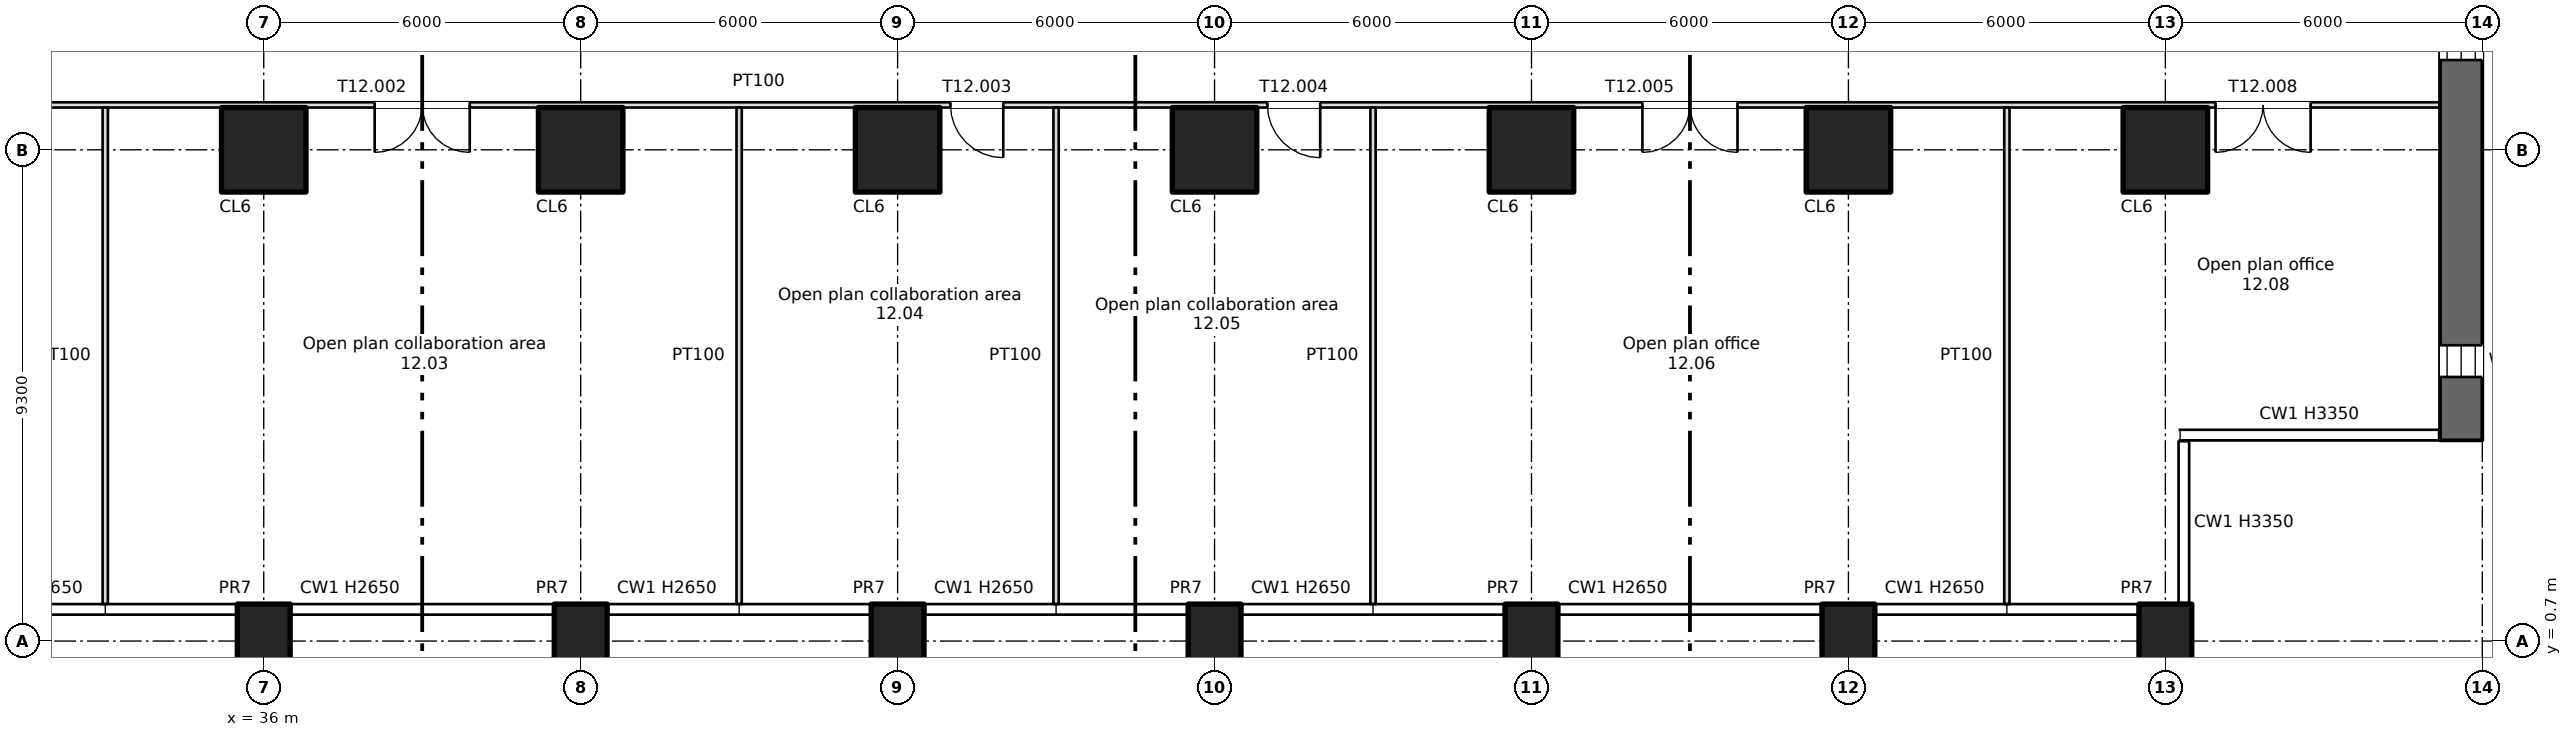
"""IFC4 building model, lengths in metres.
Left out: names, types, materials, properties, quantities, classifications, styles, units other than length and angle.
Written with IfcOpenShell. Run it as: python <this file> out.ifc"""

import sys

from ifc_helpers import new_model, si_unit, direction, frame, frame_2d, origin, origin_2d, place, context, subcontext, project, spatial, rectangle, extrude, element, fill, save


model = new_model("IFC4")
c1 = context("Model", 3, precision=1e-05, world=origin(), true_north=direction((0.0, 1.0)))
c2 = subcontext(c1, "Body", "Model", "MODEL_VIEW")
j1 = project(units=[si_unit("LENGTHUNIT", "METRE"), si_unit("PLANEANGLEUNIT", "RADIAN")], contexts=[c1])
p1 = place(None, origin())
s1 = spatial("IfcSite", under=j1, at=p1, CompositionType="ELEMENT")
p2 = place(p1, origin())
s2 = spatial("IfcBuilding", under=s1, at=p2, CompositionType="ELEMENT")
p3 = place(p2, frame((0.0, 0.0, 63.75)))
s3 = spatial("IfcBuildingStorey", under=s2, at=p3, CompositionType="ELEMENT", Elevation=63.75)
for number, where, z_axis, x_axis in (
    (1, (36.0, 0.7, -0.4), (0.0, 0.0, 1.0), (1.0, 0.0, 0.0)),
    (2, (42.0, 0.7, -0.4), (0.0, 0.0, 1.0), (1.0, 0.0, 0.0)),
    (3, (48.0, 0.7, -0.4), (0.0, 0.0, 1.0), (1.0, 0.0, 0.0)),
    (4, (54.0, 0.7, -0.4), (0.0, 0.0, 1.0), (1.0, 0.0, 0.0)),
    (5, (60.0, 0.7, -0.4), (0.0, 0.0, 1.0), (1.0, 0.0, 0.0)),
    (6, (66.0, 0.7, -0.4), (0.0, 0.0, 1.0), (1.0, 0.0, 0.0)),
    (7, (72.0, 0.7, -0.4), (0.0, 0.0, 1.0), (1.0, 0.0, 0.0)),
):
    element("IfcColumn", number, at=place(p3, frame(where, z_axis=z_axis, x_axis=x_axis)), inside=s3, PredefinedType="COLUMN", context=c2, shape_type="SweptSolid", body=[
        extrude(rectangle(XDim=1.0, YDim=1.4, at=origin_2d()), origin(), (0.0, 0.0, 1.0), 3.75),
    ])
for number, where, z_axis, x_axis in (
    (8, (36.0, 10.0, 0.0), (0.0, 0.0, 1.0), (1.0, 0.0, 0.0)),
    (9, (42.0, 10.0, 0.0), (0.0, 0.0, 1.0), (1.0, 0.0, 0.0)),
    (10, (48.0, 10.0, 0.0), (0.0, 0.0, 1.0), (1.0, 0.0, 0.0)),
    (11, (54.0, 10.0, 0.0), (0.0, 0.0, 1.0), (1.0, 0.0, 0.0)),
    (12, (60.0, 10.0, 0.0), (0.0, 0.0, 1.0), (1.0, 0.0, 0.0)),
    (13, (66.0, 10.0, 0.0), (0.0, 0.0, 1.0), (1.0, 0.0, 0.0)),
    (14, (72.0, 10.0, 0.0), (0.0, 0.0, 1.0), (1.0, 0.0, 0.0)),
):
    element("IfcColumn", number, at=place(p3, frame(where, z_axis=z_axis, x_axis=x_axis)), inside=s3, PredefinedType="COLUMN", context=c2, shape_type="SweptSolid", body=[
        extrude(rectangle(XDim=1.6, YDim=1.6, at=origin_2d()), origin(), (0.0, 0.0, 1.0), 3.35),
    ])
p4 = place(p3, frame((77.6, 4.5, 0.0), z_axis=(0.0, 0.0, 1.0), x_axis=(0.0, 1.0, 0.0)))
e15 = element("IfcWall", 15, at=p4, inside=s3, PredefinedType="SHEAR", context=c2, shape_type="SweptSolid", body=[
    extrude(rectangle(XDim=37.0, YDim=0.8, at=frame_2d((18.5, 0.0))), origin(), (0.0, 0.0, 1.0), 3.35),
])
p5 = place(p4, frame((1.2, 0.0, 0.6)))
e16 = element("IfcOpeningElement", 16, at=p5, cuts=e15, PredefinedType="OPENING", context=c2, shape_type="SweptSolid", body=[
    extrude(rectangle(XDim=0.6, YDim=2.4, at=frame_2d((0.3, 1.2))), frame((0.0, 0.41, 0.0), z_axis=(0.0, -1.0, 0.0), x_axis=(1.0, 0.0, 0.0)), (0.0, 0.0, 1.0), 0.82),
])
p6 = place(p4, frame((7.2, 0.0, 0.6)))
e17 = element("IfcOpeningElement", 17, at=p6, cuts=e15, PredefinedType="OPENING", context=c2, shape_type="SweptSolid", body=[
    extrude(rectangle(XDim=0.6, YDim=2.4, at=frame_2d((0.3, 1.2))), frame((0.0, 0.41, 0.0), z_axis=(0.0, -1.0, 0.0), x_axis=(1.0, 0.0, 0.0)), (0.0, 0.0, 1.0), 0.82),
])
p7 = place(p4, frame((13.2, 0.0, 0.6)))
e18 = element("IfcOpeningElement", 18, at=p7, cuts=e15, PredefinedType="OPENING", context=c2, shape_type="SweptSolid", body=[
    extrude(rectangle(XDim=0.6, YDim=2.4, at=frame_2d((0.3, 1.2))), frame((0.0, 0.41, 0.0), z_axis=(0.0, -1.0, 0.0), x_axis=(1.0, 0.0, 0.0)), (0.0, 0.0, 1.0), 0.82),
])
p8 = place(p4, frame((19.2, 0.0, 0.6)))
e19 = element("IfcOpeningElement", 19, at=p8, cuts=e15, PredefinedType="OPENING", context=c2, shape_type="SweptSolid", body=[
    extrude(rectangle(XDim=0.6, YDim=2.4, at=frame_2d((0.3, 1.2))), frame((0.0, 0.41, 0.0), z_axis=(0.0, -1.0, 0.0), x_axis=(1.0, 0.0, 0.0)), (0.0, 0.0, 1.0), 0.82),
])
p9 = place(p4, frame((25.2, 0.0, 0.6)))
e20 = element("IfcOpeningElement", 20, at=p9, cuts=e15, PredefinedType="OPENING", context=c2, shape_type="SweptSolid", body=[
    extrude(rectangle(XDim=0.6, YDim=2.4, at=frame_2d((0.3, 1.2))), frame((0.0, 0.41, 0.0), z_axis=(0.0, -1.0, 0.0), x_axis=(1.0, 0.0, 0.0)), (0.0, 0.0, 1.0), 0.82),
])
p10 = place(p4, frame((31.2, 0.0, 0.6)))
e21 = element("IfcOpeningElement", 21, at=p10, cuts=e15, PredefinedType="OPENING", context=c2, shape_type="SweptSolid", body=[
    extrude(rectangle(XDim=0.6, YDim=2.4, at=frame_2d((0.3, 1.2))), frame((0.0, 0.41, 0.0), z_axis=(0.0, -1.0, 0.0), x_axis=(1.0, 0.0, 0.0)), (0.0, 0.0, 1.0), 0.82),
])
p11 = place(p3, frame((0.8, 10.85, 0.0), z_axis=(0.0, 0.0, 1.0), x_axis=(1.0, 0.0, 0.0)))
e22 = element("IfcWall", 22, at=p11, inside=s3, PredefinedType="PARTITIONING", context=c2, shape_type="SweptSolid", body=[
    extrude(rectangle(XDim=76.4, YDim=0.1, at=frame_2d((38.2, 0.0))), origin(), (0.0, 0.0, 1.0), 3.35),
])
p12 = place(p11, frame((25.3, 0.0, 0.0)))
e23 = element("IfcOpeningElement", 23, at=p12, cuts=e22, PredefinedType="OPENING", context=c2, shape_type="SweptSolid", body=[
    extrude(rectangle(XDim=1.8, YDim=2.1, at=frame_2d((0.9, 1.05))), frame((0.0, 0.06, 0.0), z_axis=(0.0, -1.0, 0.0), x_axis=(1.0, 0.0, 0.0)), (0.0, 0.0, 1.0), 0.12),
])
p13 = place(p11, frame((37.3, 0.0, 0.0)))
e24 = element("IfcOpeningElement", 24, at=p13, cuts=e22, PredefinedType="OPENING", context=c2, shape_type="SweptSolid", body=[
    extrude(rectangle(XDim=1.8, YDim=2.1, at=frame_2d((0.9, 1.05))), frame((0.0, 0.06, 0.0), z_axis=(0.0, -1.0, 0.0), x_axis=(1.0, 0.0, 0.0)), (0.0, 0.0, 1.0), 0.12),
])
p14 = place(p11, frame((48.2, 0.0, 0.0)))
e25 = element("IfcOpeningElement", 25, at=p14, cuts=e22, PredefinedType="OPENING", context=c2, shape_type="SweptSolid", body=[
    extrude(rectangle(XDim=1.0, YDim=2.1, at=frame_2d((0.5, 1.05))), frame((0.0, 0.06, 0.0), z_axis=(0.0, -1.0, 0.0), x_axis=(1.0, 0.0, 0.0)), (0.0, 0.0, 1.0), 0.12),
])
p15 = place(p11, frame((54.2, 0.0, 0.0)))
e26 = element("IfcOpeningElement", 26, at=p15, cuts=e22, PredefinedType="OPENING", context=c2, shape_type="SweptSolid", body=[
    extrude(rectangle(XDim=1.0, YDim=2.1, at=frame_2d((0.5, 1.05))), frame((0.0, 0.06, 0.0), z_axis=(0.0, -1.0, 0.0), x_axis=(1.0, 0.0, 0.0)), (0.0, 0.0, 1.0), 0.12),
])
p16 = place(p11, frame((61.3, 0.0, 0.0)))
e27 = element("IfcOpeningElement", 27, at=p16, cuts=e22, PredefinedType="OPENING", context=c2, shape_type="SweptSolid", body=[
    extrude(rectangle(XDim=1.8, YDim=2.1, at=frame_2d((0.9, 1.05))), frame((0.0, 0.06, 0.0), z_axis=(0.0, -1.0, 0.0), x_axis=(1.0, 0.0, 0.0)), (0.0, 0.0, 1.0), 0.12),
])
p17 = place(p11, frame((3.2, 0.0, 0.0)))
e28 = element("IfcOpeningElement", 28, at=p17, cuts=e22, PredefinedType="OPENING", context=c2, shape_type="SweptSolid", body=[
    extrude(rectangle(XDim=1.2, YDim=2.1, at=frame_2d((0.6, 1.05))), frame((0.0, 0.06, 0.0), z_axis=(0.0, -1.0, 0.0), x_axis=(1.0, 0.0, 0.0)), (0.0, 0.0, 1.0), 0.12),
])
p18 = place(p11, frame((14.55, 0.0, 0.0)))
e29 = element("IfcOpeningElement", 29, at=p18, cuts=e22, PredefinedType="OPENING", context=c2, shape_type="SweptSolid", body=[
    extrude(rectangle(XDim=1.2, YDim=2.1, at=frame_2d((0.6, 1.05))), frame((0.0, 0.06, 0.0), z_axis=(0.0, -1.0, 0.0), x_axis=(1.0, 0.0, 0.0)), (0.0, 0.0, 1.0), 0.12),
])
p19 = place(p11, frame((72.15, 0.0, 0.0)))
e30 = element("IfcOpeningElement", 30, at=p19, cuts=e22, PredefinedType="OPENING", context=c2, shape_type="SweptSolid", body=[
    extrude(rectangle(XDim=1.8, YDim=2.1, at=frame_2d((0.9, 1.05))), frame((0.0, 0.06, 0.0), z_axis=(0.0, -1.0, 0.0), x_axis=(1.0, 0.0, 0.0)), (0.0, 0.0, 1.0), 0.12),
])
for number, where, z_axis, x_axis in (
    (31, (33.0, 1.4, 0.0), (0.0, 0.0, 1.0), (0.0, 1.0, 0.0)),
    (32, (45.0, 1.4, 0.0), (0.0, 0.0, 1.0), (0.0, 1.0, 0.0)),
    (33, (51.0, 1.4, 0.0), (0.0, 0.0, 1.0), (0.0, 1.0, 0.0)),
    (34, (57.0, 1.4, 0.0), (0.0, 0.0, 1.0), (0.0, 1.0, 0.0)),
    (35, (69.0, 1.4, 0.0), (0.0, 0.0, 1.0), (0.0, 1.0, 0.0)),
):
    element("IfcWall", number, at=place(p3, frame(where, z_axis=z_axis, x_axis=x_axis)), inside=s3, PredefinedType="PARTITIONING", context=c2, shape_type="SweptSolid", body=[
        extrude(rectangle(XDim=9.4, YDim=0.1, at=frame_2d((4.7, 0.0))), origin(), (0.0, 0.0, 1.0), 3.35),
    ])
p20 = place(p5, origin())
e36 = element("IfcWindow", 36, at=p20, inside=s3, PartitioningType="SINGLE_PANEL", PredefinedType="WINDOW", context=c2, shape_type="SweptSolid", body=[
    extrude(rectangle(XDim=0.6, YDim=2.4, at=frame_2d((0.3, 1.2))), frame((0.0, 0.03, 0.0), z_axis=(0.0, -1.0, 0.0), x_axis=(1.0, 0.0, 0.0)), (0.0, 0.0, 1.0), 0.06),
])
fill(e16, e36)
p21 = place(p6, origin())
e37 = element("IfcWindow", 37, at=p21, inside=s3, PartitioningType="SINGLE_PANEL", PredefinedType="WINDOW", context=c2, shape_type="SweptSolid", body=[
    extrude(rectangle(XDim=0.6, YDim=2.4, at=frame_2d((0.3, 1.2))), frame((0.0, 0.03, 0.0), z_axis=(0.0, -1.0, 0.0), x_axis=(1.0, 0.0, 0.0)), (0.0, 0.0, 1.0), 0.06),
])
fill(e17, e37)
p22 = place(p13, origin())
e38 = element("IfcDoor", 38, at=p22, inside=s3, OperationType="DOUBLE_DOOR_SINGLE_SWING", PredefinedType="DOOR", context=c2, shape_type="SweptSolid", body=[
    extrude(rectangle(XDim=1.8, YDim=2.1, at=frame_2d((0.9, 1.05))), frame((0.0, 0.025, 0.0), z_axis=(0.0, -1.0, 0.0), x_axis=(1.0, 0.0, 0.0)), (0.0, 0.0, 1.0), 0.05),
])
fill(e24, e38)
p23 = place(p14, origin())
e39 = element("IfcDoor", 39, at=p23, inside=s3, OperationType="SINGLE_SWING_RIGHT", PredefinedType="DOOR", context=c2, shape_type="SweptSolid", body=[
    extrude(rectangle(XDim=1.0, YDim=2.1, at=frame_2d((0.5, 1.05))), frame((0.0, 0.025, 0.0), z_axis=(0.0, -1.0, 0.0), x_axis=(1.0, 0.0, 0.0)), (0.0, 0.0, 1.0), 0.05),
])
fill(e25, e39)
p24 = place(p15, origin())
e40 = element("IfcDoor", 40, at=p24, inside=s3, OperationType="SINGLE_SWING_RIGHT", PredefinedType="DOOR", context=c2, shape_type="SweptSolid", body=[
    extrude(rectangle(XDim=1.0, YDim=2.1, at=frame_2d((0.5, 1.05))), frame((0.0, 0.025, 0.0), z_axis=(0.0, -1.0, 0.0), x_axis=(1.0, 0.0, 0.0)), (0.0, 0.0, 1.0), 0.05),
])
fill(e26, e40)
p25 = place(p16, origin())
e41 = element("IfcDoor", 41, at=p25, inside=s3, OperationType="DOUBLE_DOOR_SINGLE_SWING", PredefinedType="DOOR", context=c2, shape_type="SweptSolid", body=[
    extrude(rectangle(XDim=1.8, YDim=2.1, at=frame_2d((0.9, 1.05))), frame((0.0, 0.025, 0.0), z_axis=(0.0, -1.0, 0.0), x_axis=(1.0, 0.0, 0.0)), (0.0, 0.0, 1.0), 0.05),
])
fill(e27, e41)
p26 = place(p19, origin())
e42 = element("IfcDoor", 42, at=p26, inside=s3, OperationType="DOUBLE_DOOR_SINGLE_SWING", PredefinedType="DOOR", context=c2, shape_type="SweptSolid", body=[
    extrude(rectangle(XDim=1.8, YDim=2.1, at=frame_2d((0.9, 1.05))), frame((0.0, 0.025, 0.0), z_axis=(0.0, -1.0, 0.0), x_axis=(1.0, 0.0, 0.0)), (0.0, 0.0, 1.0), 0.05),
])
fill(e30, e42)
save(model, sys.argv[1])
